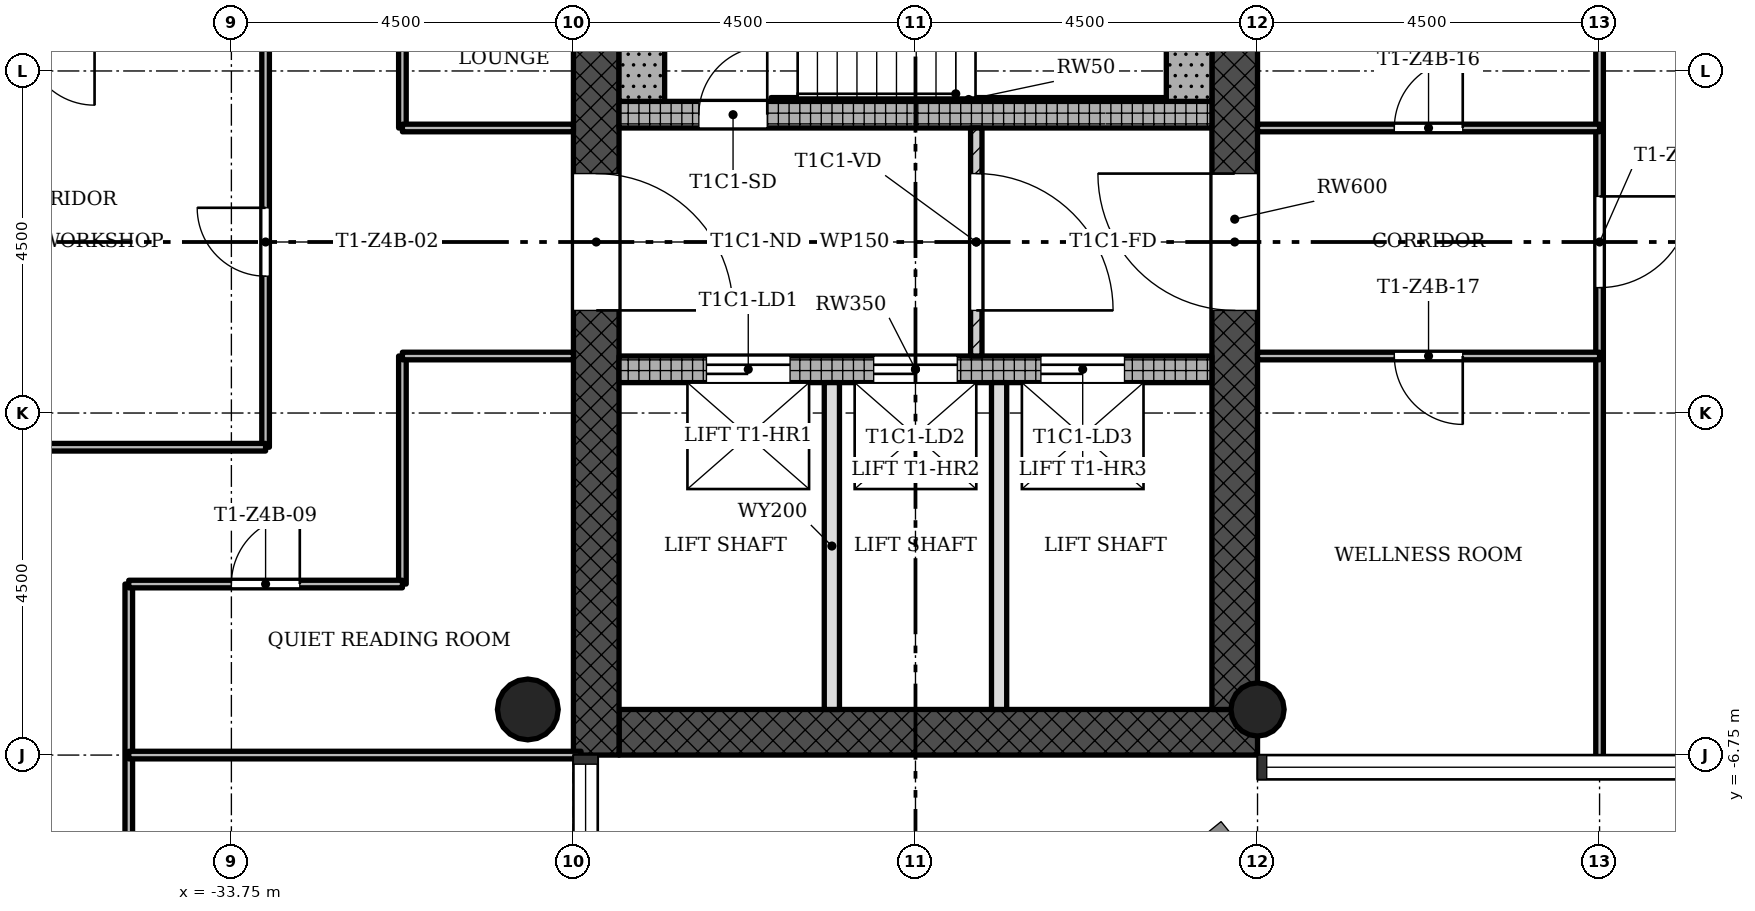
"""IFC4 building model, lengths in metres.
Left out: names, types, materials, properties, quantities, classifications, styles, units other than length and angle.
Written with IfcOpenShell. Run it as: python <this file> out.ifc"""

import sys

from ifc_helpers import new_model, si_unit, direction, frame, frame_2d, origin, origin_2d, place, context, subcontext, project, spatial, rectangle, hollow_circle, extrude, element, fill, save


model = new_model("IFC4")
c1 = context("Model", 3, precision=1e-05, world=origin(), true_north=direction((0.0, 1.0)))
c2 = subcontext(c1, "Body", "Model", "MODEL_VIEW")
j1 = project(units=[si_unit("LENGTHUNIT", "METRE"), si_unit("PLANEANGLEUNIT", "RADIAN")], contexts=[c1])
p1 = place(None, origin())
s1 = spatial("IfcSite", under=j1, at=p1, CompositionType="ELEMENT")
p2 = place(p1, origin())
s2 = spatial("IfcBuilding", under=s1, at=p2, CompositionType="ELEMENT")
p3 = place(p2, frame((0.0, 0.0, 230.0)))
s3 = spatial("IfcBuildingStorey", under=s2, at=p3, CompositionType="ELEMENT", Elevation=230.0)
p4 = place(p3, frame((-28.65, -6.45, 0.0), z_axis=(0.0, 0.0, 1.0), x_axis=(1.0, 0.0, 0.0)))
e1 = element("IfcWall", 1, at=p4, inside=s3, PredefinedType="SHEAR", context=c2, shape_type="SweptSolid", body=[
    extrude(rectangle(XDim=8.4, YDim=0.6, at=frame_2d((4.2, 0.0))), origin(), (0.0, 0.0, 1.0), 3.4),
])
p5 = place(p3, frame((-20.55, -6.15, 0.0), z_axis=(0.0, 0.0, 1.0), x_axis=(0.0, 1.0, 0.0)))
e2 = element("IfcWall", 2, at=p5, inside=s3, PredefinedType="SHEAR", context=c2, shape_type="SweptSolid", body=[
    extrude(rectangle(XDim=12.9, YDim=0.6, at=frame_2d((6.45, 0.0))), origin(), (0.0, 0.0, 1.0), 3.4),
])
p6 = place(p5, frame((5.25, 0.0, 0.0)))
e3 = element("IfcOpeningElement", 3, at=p6, cuts=e2, PredefinedType="OPENING", context=c2, shape_type="SweptSolid", body=[
    extrude(rectangle(XDim=1.8, YDim=2.1, at=frame_2d((0.9, 1.05))), frame((0.0, 0.31, 0.0), z_axis=(0.0, -1.0, 0.0), x_axis=(1.0, 0.0, 0.0)), (0.0, 0.0, 1.0), 0.62),
])
p7 = place(p3, frame((-28.95, 6.15, 0.0), z_axis=(0.0, 0.0, 1.0), x_axis=(0.0, -1.0, 0.0)))
e4 = element("IfcWall", 4, at=p7, inside=s3, PredefinedType="SHEAR", context=c2, shape_type="SweptSolid", body=[
    extrude(rectangle(XDim=12.9, YDim=0.6, at=frame_2d((6.45, 0.0))), origin(), (0.0, 0.0, 1.0), 3.4),
])
p8 = place(p7, frame((5.25, 0.0, 0.0)))
e5 = element("IfcOpeningElement", 5, at=p8, cuts=e4, PredefinedType="OPENING", context=c2, shape_type="SweptSolid", body=[
    extrude(rectangle(XDim=1.8, YDim=2.1, at=frame_2d((0.9, 1.05))), frame((0.0, 0.31, 0.0), z_axis=(0.0, -1.0, 0.0), x_axis=(1.0, 0.0, 0.0)), (0.0, 0.0, 1.0), 0.62),
])
p9 = place(p3, frame((-28.65, -1.675, 0.0), z_axis=(0.0, 0.0, 1.0), x_axis=(1.0, 0.0, 0.0)))
e6 = element("IfcWall", 6, at=p9, inside=s3, PredefinedType="SHEAR", context=c2, shape_type="SweptSolid", body=[
    extrude(rectangle(XDim=7.8, YDim=0.35, at=frame_2d((3.9, 0.0))), origin(), (0.0, 0.0, 1.0), 3.4),
])
p10 = place(p9, frame((1.15, 0.0, 0.0)))
e7 = element("IfcOpeningElement", 7, at=p10, cuts=e6, PredefinedType="OPENING", context=c2, shape_type="SweptSolid", body=[
    extrude(rectangle(XDim=1.1, YDim=2.1, at=frame_2d((0.55, 1.05))), frame((0.0, 0.185, 0.0), z_axis=(0.0, -1.0, 0.0), x_axis=(1.0, 0.0, 0.0)), (0.0, 0.0, 1.0), 0.37),
])
p11 = place(p9, frame((3.35, 0.0, 0.0)))
e8 = element("IfcOpeningElement", 8, at=p11, cuts=e6, PredefinedType="OPENING", context=c2, shape_type="SweptSolid", body=[
    extrude(rectangle(XDim=1.1, YDim=2.1, at=frame_2d((0.55, 1.05))), frame((0.0, 0.185, 0.0), z_axis=(0.0, -1.0, 0.0), x_axis=(1.0, 0.0, 0.0)), (0.0, 0.0, 1.0), 0.37),
])
p12 = place(p9, frame((5.55, 0.0, 0.0)))
e9 = element("IfcOpeningElement", 9, at=p12, cuts=e6, PredefinedType="OPENING", context=c2, shape_type="SweptSolid", body=[
    extrude(rectangle(XDim=1.1, YDim=2.1, at=frame_2d((0.55, 1.05))), frame((0.0, 0.185, 0.0), z_axis=(0.0, -1.0, 0.0), x_axis=(1.0, 0.0, 0.0)), (0.0, 0.0, 1.0), 0.37),
])
p13 = place(p3, frame((-28.65, 1.675, 0.0), z_axis=(0.0, 0.0, 1.0), x_axis=(1.0, 0.0, 0.0)))
e10 = element("IfcWall", 10, at=p13, inside=s3, PredefinedType="SHEAR", context=c2, shape_type="SweptSolid", body=[
    extrude(rectangle(XDim=7.8, YDim=0.35, at=frame_2d((3.9, 0.0))), origin(), (0.0, 0.0, 1.0), 3.4),
])
p14 = place(p13, frame((1.05, 0.0, 0.0)))
e11 = element("IfcOpeningElement", 11, at=p14, cuts=e10, PredefinedType="OPENING", context=c2, shape_type="SweptSolid", body=[
    extrude(rectangle(XDim=0.9, YDim=2.1, at=frame_2d((0.45, 1.05))), frame((0.0, 0.185, 0.0), z_axis=(0.0, -1.0, 0.0), x_axis=(1.0, 0.0, 0.0)), (0.0, 0.0, 1.0), 0.37),
])
p15 = place(p3, frame((-20.25, -6.15, 0.0), z_axis=(0.0, 0.0, 1.0), x_axis=(1.0, 0.0, 0.0)))
e12 = element("IfcColumn", 12, at=p15, inside=s3, PredefinedType="COLUMN", context=c2, shape_type="SweptSolid", body=[
    extrude(hollow_circle(Radius=0.35, WallThickness=0.025, at=origin_2d()), origin(), (0.0, 0.0, 1.0), 3.4),
])
p16 = place(p3, frame((-29.85, -6.15, 0.0), z_axis=(0.0, 0.0, 1.0), x_axis=(1.0, 0.0, 0.0)))
e13 = element("IfcColumn", 13, at=p16, inside=s3, PredefinedType="COLUMN", context=c2, shape_type="SweptSolid", body=[
    extrude(hollow_circle(Radius=0.4, WallThickness=0.028, at=origin_2d()), origin(), (0.0, 0.0, 1.0), 3.4),
])
p17 = place(p3, frame((-23.95, -1.5, 0.0), z_axis=(0.0, 0.0, 1.0), x_axis=(0.0, 1.0, 0.0)))
e14 = element("IfcWall", 14, at=p17, inside=s3, PredefinedType="PARTITIONING", context=c2, shape_type="SweptSolid", body=[
    extrude(rectangle(XDim=3.0, YDim=0.15, at=frame_2d((1.5, 0.0))), origin(), (0.0, 0.0, 1.0), 2.98),
])
p18 = place(p17, frame((0.6, 0.0, 0.0)))
e15 = element("IfcOpeningElement", 15, at=p18, cuts=e14, PredefinedType="OPENING", context=c2, shape_type="SweptSolid", body=[
    extrude(rectangle(XDim=1.8, YDim=2.1, at=frame_2d((0.9, 1.05))), frame((0.0, 0.085, 0.0), z_axis=(0.0, -1.0, 0.0), x_axis=(1.0, 0.0, 0.0)), (0.0, 0.0, 1.0), 0.17),
])
for number, where, z_axis, x_axis in (
    (16, (-25.85, -6.15, 0.0), (0.0, 0.0, 1.0), (0.0, 1.0, 0.0)),
    (17, (-23.65, -6.15, 0.0), (0.0, 0.0, 1.0), (0.0, 1.0, 0.0)),
):
    element("IfcWall", number, at=place(p3, frame(where, z_axis=z_axis, x_axis=x_axis)), inside=s3, PredefinedType="SOLIDWALL", context=c2, shape_type="SweptSolid", body=[
        extrude(rectangle(XDim=4.3, YDim=0.2, at=frame_2d((2.15, 0.0))), origin(), (0.0, 0.0, 1.0), 2.98),
    ])
p19 = place(p3, frame((-35.1, -8.55, 0.0), z_axis=(0.0, 0.0, 1.0), x_axis=(0.0, 1.0, 0.0)))
e18 = element("IfcWall", 18, at=p19, inside=s3, PredefinedType="PARTITIONING", context=c2, shape_type="SweptSolid", body=[
    extrude(rectangle(XDim=4.05, YDim=0.1, at=frame_2d((2.025, 0.0))), origin(), (0.0, 0.0, 1.0), 2.98),
])
p20 = place(p3, frame((-33.3, -2.7, 0.0), z_axis=(0.0, 0.0, 1.0), x_axis=(0.0, 1.0, 0.0)))
e19 = element("IfcWall", 19, at=p20, inside=s3, PredefinedType="PARTITIONING", context=c2, shape_type="SweptSolid", body=[
    extrude(rectangle(XDim=5.4, YDim=0.1, at=frame_2d((2.7, 0.0))), origin(), (0.0, 0.0, 1.0), 2.98),
])
p21 = place(p20, frame((2.25, 0.0, 0.0)))
e20 = element("IfcOpeningElement", 20, at=p21, cuts=e19, PredefinedType="OPENING", context=c2, shape_type="SweptSolid", body=[
    extrude(rectangle(XDim=0.9, YDim=2.1, at=frame_2d((0.45, 1.05))), frame((0.0, 0.06, 0.0), z_axis=(0.0, -1.0, 0.0), x_axis=(1.0, 0.0, 0.0)), (0.0, 0.0, 1.0), 0.12),
])
p22 = place(p3, frame((-31.5, -4.5, 0.0), z_axis=(0.0, 0.0, 1.0), x_axis=(0.0, 1.0, 0.0)))
e21 = element("IfcWall", 21, at=p22, inside=s3, PredefinedType="PARTITIONING", context=c2, shape_type="SweptSolid", body=[
    extrude(rectangle(XDim=3.0, YDim=0.1, at=frame_2d((1.5, 0.0))), origin(), (0.0, 0.0, 1.0), 2.98),
])
p23 = place(p3, frame((-31.5, 1.5, 0.0), z_axis=(0.0, 0.0, 1.0), x_axis=(0.0, 1.0, 0.0)))
e22 = element("IfcWall", 22, at=p23, inside=s3, PredefinedType="PARTITIONING", context=c2, shape_type="SweptSolid", body=[
    extrude(rectangle(XDim=3.0, YDim=0.1, at=frame_2d((1.5, 0.0))), origin(), (0.0, 0.0, 1.0), 2.98),
])
p24 = place(p23, frame((1.05, 0.0, 0.0)))
e23 = element("IfcOpeningElement", 23, at=p24, cuts=e22, PredefinedType="OPENING", context=c2, shape_type="SweptSolid", body=[
    extrude(rectangle(XDim=0.9, YDim=2.1, at=frame_2d((0.45, 1.05))), frame((0.0, 0.06, 0.0), z_axis=(0.0, -1.0, 0.0), x_axis=(1.0, 0.0, 0.0)), (0.0, 0.0, 1.0), 0.12),
])
p25 = place(p3, frame((-15.75, -6.85, 0.0), z_axis=(0.0, 0.0, 1.0), x_axis=(0.0, 1.0, 0.0)))
e24 = element("IfcWall", 24, at=p25, inside=s3, PredefinedType="PARTITIONING", context=c2, shape_type="SweptSolid", body=[
    extrude(rectangle(XDim=13.7, YDim=0.1, at=frame_2d((6.85, 0.0))), origin(), (0.0, 0.0, 1.0), 2.98),
])
p26 = place(p25, frame((6.25, 0.0, 0.0)))
e25 = element("IfcOpeningElement", 25, at=p26, cuts=e24, PredefinedType="OPENING", context=c2, shape_type="SweptSolid", body=[
    extrude(rectangle(XDim=1.2, YDim=2.1, at=frame_2d((0.6, 1.05))), frame((0.0, 0.06, 0.0), z_axis=(0.0, -1.0, 0.0), x_axis=(1.0, 0.0, 0.0)), (0.0, 0.0, 1.0), 0.12),
])
p27 = place(p3, frame((-35.1, -6.75, 0.0), z_axis=(0.0, 0.0, 1.0), x_axis=(1.0, 0.0, 0.0)))
e26 = element("IfcWall", 26, at=p27, inside=s3, PredefinedType="PARTITIONING", context=c2, shape_type="SweptSolid", body=[
    extrude(rectangle(XDim=5.95, YDim=0.1, at=frame_2d((2.975, 0.0))), origin(), (0.0, 0.0, 1.0), 2.98),
])
p28 = place(p3, frame((-35.1, -4.5, 0.0), z_axis=(0.0, 0.0, 1.0), x_axis=(1.0, 0.0, 0.0)))
e27 = element("IfcWall", 27, at=p28, inside=s3, PredefinedType="PARTITIONING", context=c2, shape_type="SweptSolid", body=[
    extrude(rectangle(XDim=3.6, YDim=0.1, at=frame_2d((1.8, 0.0))), origin(), (0.0, 0.0, 1.0), 2.98),
])
p29 = place(p28, frame((1.35, 0.0, 0.0)))
e28 = element("IfcOpeningElement", 28, at=p29, cuts=e27, PredefinedType="OPENING", context=c2, shape_type="SweptSolid", body=[
    extrude(rectangle(XDim=0.9, YDim=2.1, at=frame_2d((0.45, 1.05))), frame((0.0, 0.06, 0.0), z_axis=(0.0, -1.0, 0.0), x_axis=(1.0, 0.0, 0.0)), (0.0, 0.0, 1.0), 0.12),
])
p30 = place(p3, frame((-38.7, -2.7, 0.0), z_axis=(0.0, 0.0, 1.0), x_axis=(1.0, 0.0, 0.0)))
e29 = element("IfcWall", 29, at=p30, inside=s3, PredefinedType="PARTITIONING", context=c2, shape_type="SweptSolid", body=[
    extrude(rectangle(XDim=5.4, YDim=0.1, at=frame_2d((2.7, 0.0))), origin(), (0.0, 0.0, 1.0), 2.98),
])
p31 = place(p3, frame((-31.5, -1.5, 0.0), z_axis=(0.0, 0.0, 1.0), x_axis=(1.0, 0.0, 0.0)))
e30 = element("IfcWall", 30, at=p31, inside=s3, PredefinedType="PARTITIONING", context=c2, shape_type="SweptSolid", body=[
    extrude(rectangle(XDim=2.25, YDim=0.1, at=frame_2d((1.125, 0.0))), origin(), (0.0, 0.0, 1.0), 2.98),
])
p32 = place(p3, frame((-20.25, -1.5, 0.0), z_axis=(0.0, 0.0, 1.0), x_axis=(1.0, 0.0, 0.0)))
e31 = element("IfcWall", 31, at=p32, inside=s3, PredefinedType="PARTITIONING", context=c2, shape_type="SweptSolid", body=[
    extrude(rectangle(XDim=4.5, YDim=0.1, at=frame_2d((2.25, 0.0))), origin(), (0.0, 0.0, 1.0), 2.98),
])
p33 = place(p32, frame((1.8, 0.0, 0.0)))
e32 = element("IfcOpeningElement", 32, at=p33, cuts=e31, PredefinedType="OPENING", context=c2, shape_type="SweptSolid", body=[
    extrude(rectangle(XDim=0.9, YDim=2.1, at=frame_2d((0.45, 1.05))), frame((0.0, 0.06, 0.0), z_axis=(0.0, -1.0, 0.0), x_axis=(1.0, 0.0, 0.0)), (0.0, 0.0, 1.0), 0.12),
])
p34 = place(p3, frame((-31.5, 1.5, 0.0), z_axis=(0.0, 0.0, 1.0), x_axis=(1.0, 0.0, 0.0)))
e33 = element("IfcWall", 33, at=p34, inside=s3, PredefinedType="PARTITIONING", context=c2, shape_type="SweptSolid", body=[
    extrude(rectangle(XDim=2.25, YDim=0.1, at=frame_2d((1.125, 0.0))), origin(), (0.0, 0.0, 1.0), 2.98),
])
p35 = place(p3, frame((-20.25, 1.5, 0.0), z_axis=(0.0, 0.0, 1.0), x_axis=(1.0, 0.0, 0.0)))
e34 = element("IfcWall", 34, at=p35, inside=s3, PredefinedType="PARTITIONING", context=c2, shape_type="SweptSolid", body=[
    extrude(rectangle(XDim=4.5, YDim=0.1, at=frame_2d((2.25, 0.0))), origin(), (0.0, 0.0, 1.0), 2.98),
])
p36 = place(p35, frame((1.8, 0.0, 0.0)))
e35 = element("IfcOpeningElement", 35, at=p36, cuts=e34, PredefinedType="OPENING", context=c2, shape_type="SweptSolid", body=[
    extrude(rectangle(XDim=0.9, YDim=2.1, at=frame_2d((0.45, 1.05))), frame((0.0, 0.06, 0.0), z_axis=(0.0, -1.0, 0.0), x_axis=(1.0, 0.0, 0.0)), (0.0, 0.0, 1.0), 0.12),
])
for number, where, z_axis, x_axis in (
    (36, (-21.15, 1.85, 0.0), (0.0, 0.0, 1.0), (0.0, 1.0, 0.0)),
    (37, (-28.35, 1.85, 0.0), (0.0, 0.0, 1.0), (0.0, 1.0, 0.0)),
):
    element("IfcWall", number, at=place(p3, frame(where, z_axis=z_axis, x_axis=x_axis)), inside=s3, PredefinedType="SHEAR", context=c2, shape_type="SweptSolid", body=[
        extrude(rectangle(XDim=4.3, YDim=0.6, at=frame_2d((2.15, 0.0))), origin(), (0.0, 0.0, 1.0), 3.4),
    ])
p37 = place(p3, frame((-26.65, 1.875, 0.0), z_axis=(0.0, 0.0, 1.0), x_axis=(1.0, 0.0, 0.0)))
e38 = element("IfcWall", 38, at=p37, inside=s3, PredefinedType="SHEAR", context=c2, shape_type="SweptSolid", body=[
    extrude(rectangle(XDim=5.2, YDim=0.05, at=frame_2d((2.6, 0.0))), origin(), (0.0, 0.0, 1.0), 3.4),
])
p38 = place(p18, origin())
e39 = element("IfcDoor", 39, at=p38, inside=s3, OperationType="SINGLE_SWING_LEFT", PredefinedType="DOOR", context=c2, shape_type="SweptSolid", body=[
    extrude(rectangle(XDim=1.8, YDim=2.1, at=frame_2d((0.9, 1.05))), frame((0.0, 0.025, 0.0), z_axis=(0.0, -1.0, 0.0), x_axis=(1.0, 0.0, 0.0)), (0.0, 0.0, 1.0), 0.05),
])
fill(e15, e39)
p39 = place(p21, origin())
e40 = element("IfcDoor", 40, at=p39, inside=s3, OperationType="SINGLE_SWING_LEFT", PredefinedType="DOOR", context=c2, shape_type="SweptSolid", body=[
    extrude(rectangle(XDim=0.9, YDim=2.1, at=frame_2d((0.45, 1.05))), frame((0.0, 0.025, 0.0), z_axis=(0.0, -1.0, 0.0), x_axis=(1.0, 0.0, 0.0)), (0.0, 0.0, 1.0), 0.05),
])
fill(e20, e40)
p40 = place(p29, origin())
e41 = element("IfcDoor", 41, at=p40, inside=s3, OperationType="SINGLE_SWING_LEFT", PredefinedType="DOOR", context=c2, shape_type="SweptSolid", body=[
    extrude(rectangle(XDim=0.9, YDim=2.1, at=frame_2d((0.45, 1.05))), frame((0.0, 0.025, 0.0), z_axis=(0.0, -1.0, 0.0), x_axis=(1.0, 0.0, 0.0)), (0.0, 0.0, 1.0), 0.05),
])
fill(e28, e41)
p41 = place(p36, origin())
e42 = element("IfcDoor", 42, at=p41, inside=s3, OperationType="SINGLE_SWING_LEFT", PredefinedType="DOOR", context=c2, shape_type="SweptSolid", body=[
    extrude(rectangle(XDim=0.9, YDim=2.1, at=frame_2d((0.45, 1.05))), frame((0.0, 0.025, 0.0), z_axis=(0.0, -1.0, 0.0), x_axis=(1.0, 0.0, 0.0)), (0.0, 0.0, 1.0), 0.05),
])
fill(e35, e42)
p42 = place(p33, origin())
e43 = element("IfcDoor", 43, at=p42, inside=s3, OperationType="SINGLE_SWING_RIGHT", PredefinedType="DOOR", context=c2, shape_type="SweptSolid", body=[
    extrude(rectangle(XDim=0.9, YDim=2.1, at=frame_2d((0.45, 1.05))), frame((0.0, 0.025, 0.0), z_axis=(0.0, -1.0, 0.0), x_axis=(1.0, 0.0, 0.0)), (0.0, 0.0, 1.0), 0.05),
])
fill(e32, e43)
p43 = place(p26, origin())
e44 = element("IfcDoor", 44, at=p43, inside=s3, OperationType="SINGLE_SWING_RIGHT", PredefinedType="DOOR", context=c2, shape_type="SweptSolid", body=[
    extrude(rectangle(XDim=1.2, YDim=2.1, at=frame_2d((0.6, 1.05))), frame((0.0, 0.025, 0.0), z_axis=(0.0, -1.0, 0.0), x_axis=(1.0, 0.0, 0.0)), (0.0, 0.0, 1.0), 0.05),
])
fill(e25, e44)
p44 = place(p14, origin())
e45 = element("IfcDoor", 45, at=p44, inside=s3, OperationType="SINGLE_SWING_LEFT", PredefinedType="DOOR", context=c2, shape_type="SweptSolid", body=[
    extrude(rectangle(XDim=0.9, YDim=2.1, at=frame_2d((0.45, 1.05))), frame((0.0, 0.025, 0.0), z_axis=(0.0, -1.0, 0.0), x_axis=(1.0, 0.0, 0.0)), (0.0, 0.0, 1.0), 0.05),
])
fill(e11, e45)
p45 = place(p10, origin())
e46 = element("IfcDoor", 46, at=p45, inside=s3, OperationType="SLIDING_TO_LEFT", PredefinedType="DOOR", context=c2, shape_type="SweptSolid", body=[
    extrude(rectangle(XDim=1.1, YDim=2.1, at=frame_2d((0.55, 1.05))), frame((0.0, 0.025, 0.0), z_axis=(0.0, -1.0, 0.0), x_axis=(1.0, 0.0, 0.0)), (0.0, 0.0, 1.0), 0.05),
])
fill(e7, e46)
p46 = place(p11, origin())
e47 = element("IfcDoor", 47, at=p46, inside=s3, OperationType="SLIDING_TO_LEFT", PredefinedType="DOOR", context=c2, shape_type="SweptSolid", body=[
    extrude(rectangle(XDim=1.1, YDim=2.1, at=frame_2d((0.55, 1.05))), frame((0.0, 0.025, 0.0), z_axis=(0.0, -1.0, 0.0), x_axis=(1.0, 0.0, 0.0)), (0.0, 0.0, 1.0), 0.05),
])
fill(e8, e47)
p47 = place(p12, origin())
e48 = element("IfcDoor", 48, at=p47, inside=s3, OperationType="SLIDING_TO_LEFT", PredefinedType="DOOR", context=c2, shape_type="SweptSolid", body=[
    extrude(rectangle(XDim=1.1, YDim=2.1, at=frame_2d((0.55, 1.05))), frame((0.0, 0.025, 0.0), z_axis=(0.0, -1.0, 0.0), x_axis=(1.0, 0.0, 0.0)), (0.0, 0.0, 1.0), 0.05),
])
fill(e9, e48)
p48 = place(p8, origin())
e49 = element("IfcDoor", 49, at=p48, inside=s3, OperationType="SINGLE_SWING_LEFT", PredefinedType="DOOR", context=c2, shape_type="SweptSolid", body=[
    extrude(rectangle(XDim=1.8, YDim=2.1, at=frame_2d((0.9, 1.05))), frame((0.0, 0.025, 0.0), z_axis=(0.0, -1.0, 0.0), x_axis=(1.0, 0.0, 0.0)), (0.0, 0.0, 1.0), 0.05),
])
fill(e5, e49)
p49 = place(p6, origin())
e50 = element("IfcDoor", 50, at=p49, inside=s3, OperationType="SINGLE_SWING_LEFT", PredefinedType="DOOR", context=c2, shape_type="SweptSolid", body=[
    extrude(rectangle(XDim=1.8, YDim=2.1, at=frame_2d((0.9, 1.05))), frame((0.0, 0.025, 0.0), z_axis=(0.0, -1.0, 0.0), x_axis=(1.0, 0.0, 0.0)), (0.0, 0.0, 1.0), 0.05),
])
fill(e3, e50)
save(model, sys.argv[1])
